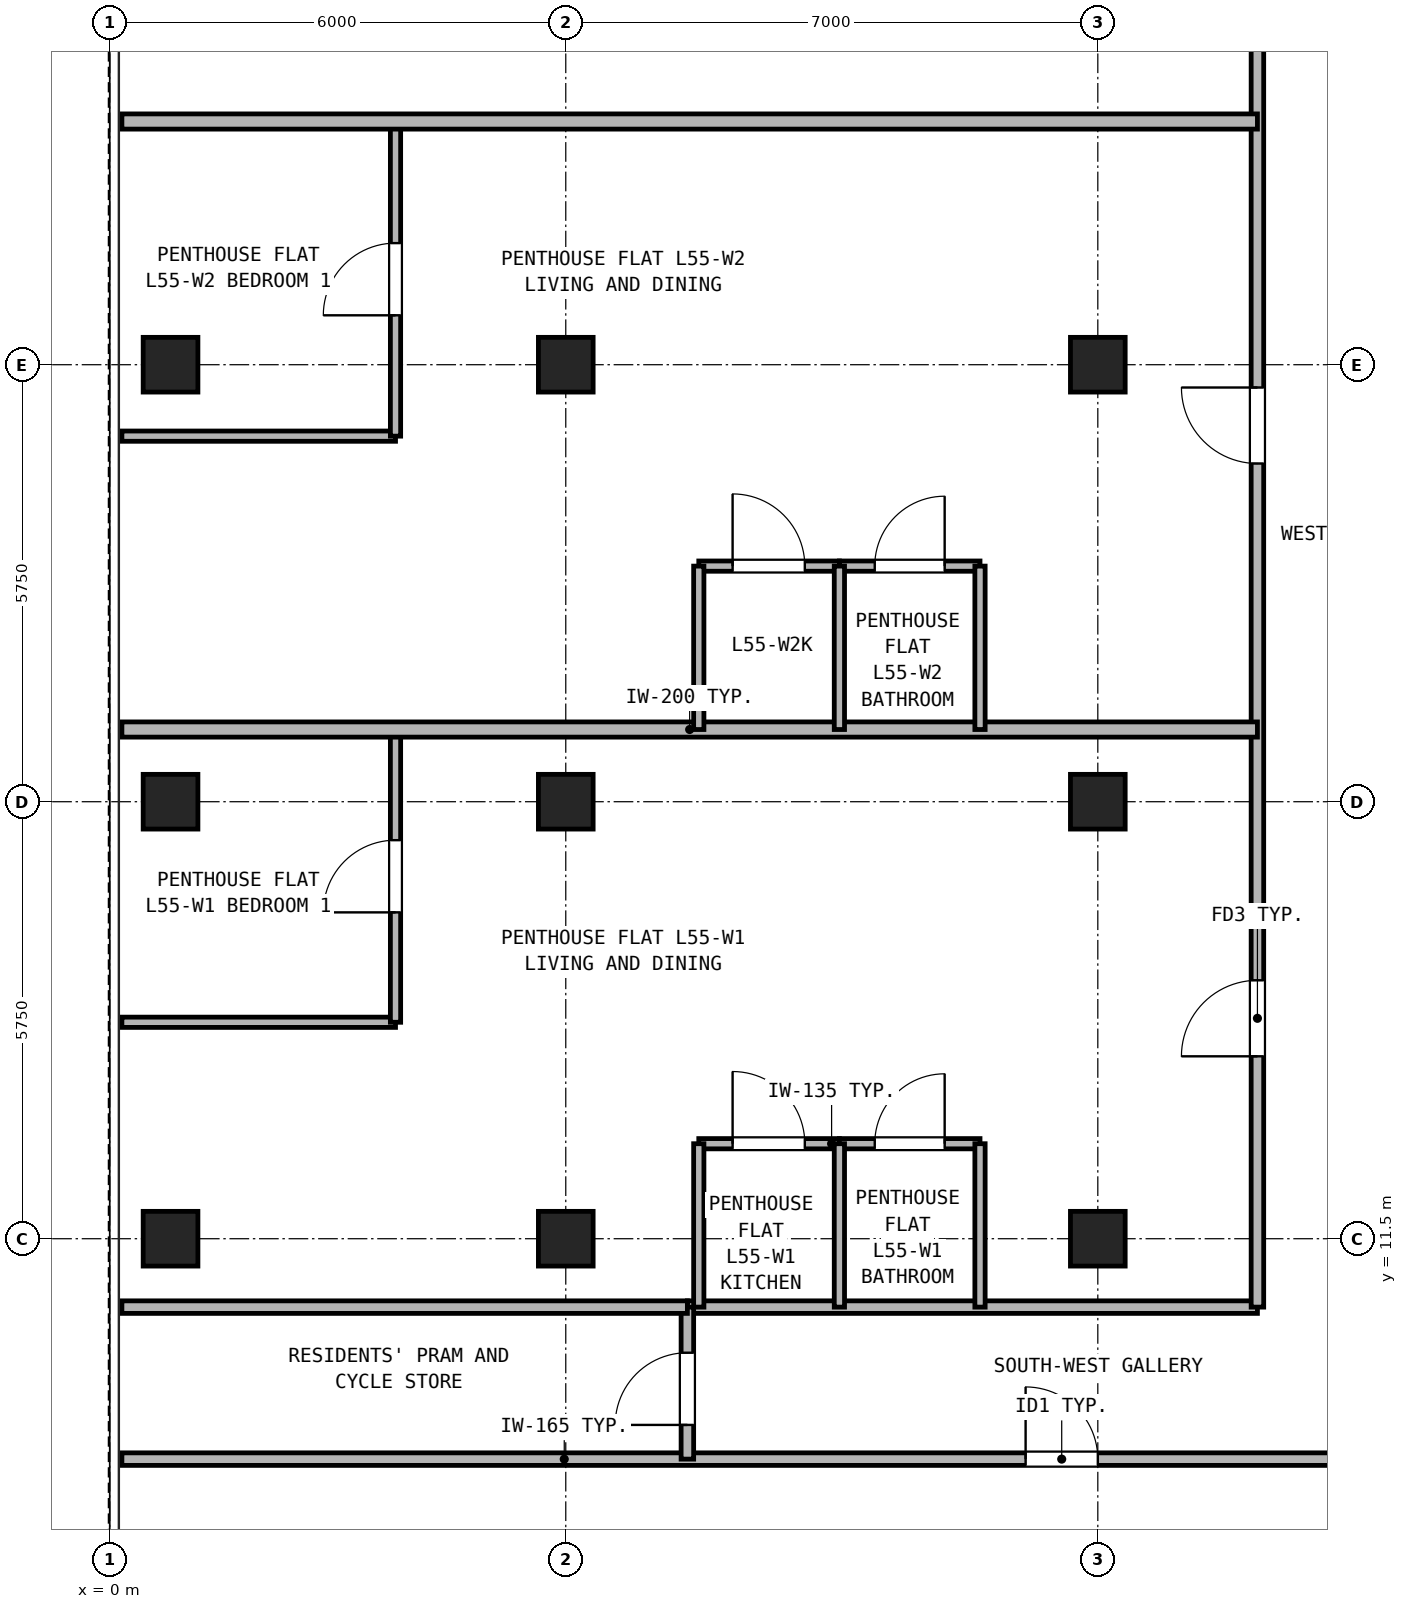
"""IFC4 building model, lengths in metres.
Left out: names, types, materials, properties, quantities, classifications, styles, units other than length and angle.
Written with IfcOpenShell. Run it as: python <this file> out.ifc"""

import sys

from ifc_helpers import new_model, si_unit, direction, frame, frame_2d, origin, origin_2d, place, context, subcontext, project, spatial, rectangle, hollow_rectangle, extrude, source, transform, mapped, element, fill, save


model = new_model("IFC4")
c1 = context("Model", 3, precision=1e-05, world=origin(), true_north=direction((0.0, 1.0)))
c2 = subcontext(c1, "Body", "Model", "MODEL_VIEW")
j1 = project(units=[si_unit("LENGTHUNIT", "METRE"), si_unit("PLANEANGLEUNIT", "RADIAN")], contexts=[c1])
p1 = place(None, origin())
s1 = spatial("IfcSite", under=j1, at=p1, CompositionType="ELEMENT")
p2 = place(p1, origin())
s2 = spatial("IfcBuilding", under=s1, at=p2, CompositionType="ELEMENT")
p3 = place(p2, frame((0.0, 0.0, 196.4)))
s3 = spatial("IfcBuildingStorey", under=s2, at=p3, CompositionType="ELEMENT", Elevation=196.4)
m1 = source(origin(), c2, "Body", "SweptSolid", [
    extrude(hollow_rectangle(XDim=0.72, YDim=0.72, WallThickness=0.04, at=origin_2d()), origin(), (0.0, 0.0, 1.0), 2.95),
])
for number, where, z_axis, x_axis in (
    (1, (0.8, 11.5, 0.0), (0.0, 0.0, 1.0), (1.0, 0.0, 0.0)),
    (2, (0.8, 17.25, 0.0), (0.0, 0.0, 1.0), (1.0, 0.0, 0.0)),
    (3, (0.8, 23.0, 0.0), (0.0, 0.0, 1.0), (1.0, 0.0, 0.0)),
    (4, (6.0, 11.5, 0.0), (0.0, 0.0, 1.0), (1.0, 0.0, 0.0)),
    (5, (6.0, 17.25, 0.0), (0.0, 0.0, 1.0), (1.0, 0.0, 0.0)),
    (6, (6.0, 23.0, 0.0), (0.0, 0.0, 1.0), (1.0, 0.0, 0.0)),
    (7, (13.0, 11.5, 0.0), (0.0, 0.0, 1.0), (1.0, 0.0, 0.0)),
    (8, (13.0, 17.25, 0.0), (0.0, 0.0, 1.0), (1.0, 0.0, 0.0)),
    (9, (13.0, 23.0, 0.0), (0.0, 0.0, 1.0), (1.0, 0.0, 0.0)),
):
    element("IfcColumn", number, at=place(p3, frame(where, z_axis=z_axis, x_axis=x_axis)), inside=s3, PredefinedType="COLUMN", context=c2, shape_type="MappedRepresentation", body=[
        mapped(m1, transform((0.0, 0.0, 0.0), x_axis=(1.0, 0.0, 0.0), y_axis=(0.0, 1.0, 0.0), z_axis=(0.0, 0.0, 1.0), scale=1.0)),
    ])
p4 = place(p3, frame((0.16, 8.6, 0.0), z_axis=(0.0, 0.0, 1.0), x_axis=(1.0, 0.0, 0.0)))
e10 = element("IfcWall", 10, at=p4, inside=s3, PredefinedType="PARTITIONING", context=c2, shape_type="SweptSolid", body=[
    extrude(rectangle(XDim=41.48, YDim=0.165, at=frame_2d((20.74, 0.0))), origin(), (0.0, 0.0, 1.0), 2.583),
])
p5 = place(p4, frame((11.89, 0.0, 0.0)))
e11 = element("IfcOpeningElement", 11, at=p5, cuts=e10, PredefinedType="OPENING", context=c2, shape_type="SweptSolid", body=[
    extrude(rectangle(XDim=0.95, YDim=2.15, at=frame_2d((0.475, 1.075))), frame((0.0, 0.093, 0.0), z_axis=(0.0, -1.0, 0.0), x_axis=(1.0, 0.0, 0.0)), (0.0, 0.0, 1.0), 0.185),
])
p6 = place(p4, frame((20.59, 0.0, 0.0)))
e12 = element("IfcOpeningElement", 12, at=p6, cuts=e10, PredefinedType="OPENING", context=c2, shape_type="SweptSolid", body=[
    extrude(rectangle(XDim=0.95, YDim=2.15, at=frame_2d((0.475, 1.075))), frame((0.0, 0.093, 0.0), z_axis=(0.0, -1.0, 0.0), x_axis=(1.0, 0.0, 0.0)), (0.0, 0.0, 1.0), 0.185),
])
p7 = place(p4, frame((27.59, 0.0, 0.0)))
e13 = element("IfcOpeningElement", 13, at=p7, cuts=e10, PredefinedType="OPENING", context=c2, shape_type="SweptSolid", body=[
    extrude(rectangle(XDim=0.95, YDim=2.15, at=frame_2d((0.475, 1.075))), frame((0.0, 0.093, 0.0), z_axis=(0.0, -1.0, 0.0), x_axis=(1.0, 0.0, 0.0)), (0.0, 0.0, 1.0), 0.185),
])
p8 = place(p4, frame((34.19, 0.0, 0.0)))
e14 = element("IfcOpeningElement", 14, at=p8, cuts=e10, PredefinedType="OPENING", context=c2, shape_type="SweptSolid", body=[
    extrude(rectangle(XDim=0.95, YDim=2.15, at=frame_2d((0.475, 1.075))), frame((0.0, 0.093, 0.0), z_axis=(0.0, -1.0, 0.0), x_axis=(1.0, 0.0, 0.0)), (0.0, 0.0, 1.0), 0.185),
])
p9 = place(p3, frame((7.6, 10.6, 0.0), z_axis=(0.0, 0.0, 1.0), x_axis=(1.0, 0.0, 0.0)))
e15 = element("IfcWall", 15, at=p9, inside=s3, PredefinedType="PARTITIONING", context=c2, shape_type="SweptSolid", body=[
    extrude(rectangle(XDim=7.5, YDim=0.165, at=frame_2d((3.75, 0.0))), origin(), (0.0, 0.0, 1.0), 2.95),
])
p10 = place(p3, frame((7.6, 8.6, 0.0), z_axis=(0.0, 0.0, 1.0), x_axis=(0.0, 1.0, 0.0)))
e16 = element("IfcWall", 16, at=p10, inside=s3, PredefinedType="PARTITIONING", context=c2, shape_type="SweptSolid", body=[
    extrude(rectangle(XDim=2.0, YDim=0.165, at=frame_2d((1.0, 0.0))), origin(), (0.0, 0.0, 1.0), 2.95),
])
p11 = place(p10, frame((0.45, 0.0, 0.0)))
e17 = element("IfcOpeningElement", 17, at=p11, cuts=e16, PredefinedType="OPENING", context=c2, shape_type="SweptSolid", body=[
    extrude(rectangle(XDim=0.95, YDim=2.15, at=frame_2d((0.475, 1.075))), frame((0.0, 0.093, 0.0), z_axis=(0.0, -1.0, 0.0), x_axis=(1.0, 0.0, 0.0)), (0.0, 0.0, 1.0), 0.185),
])
p12 = place(p3, frame((15.1, 10.6, 0.0), z_axis=(0.0, 0.0, 1.0), x_axis=(0.0, 1.0, 0.0)))
e18 = element("IfcWall", 18, at=p12, inside=s3, PredefinedType="PARTITIONING", context=c2, shape_type="SweptSolid", body=[
    extrude(rectangle(XDim=24.54, YDim=0.165, at=frame_2d((12.27, 0.0))), origin(), (0.0, 0.0, 1.0), 2.95),
])
p13 = place(p12, frame((3.3, 0.0, 0.0)))
e19 = element("IfcOpeningElement", 19, at=p13, cuts=e18, PredefinedType="OPENING", context=c2, shape_type="SweptSolid", body=[
    extrude(rectangle(XDim=1.0, YDim=2.15, at=frame_2d((0.5, 1.075))), frame((0.0, 0.093, 0.0), z_axis=(0.0, -1.0, 0.0), x_axis=(1.0, 0.0, 0.0)), (0.0, 0.0, 1.0), 0.185),
])
p14 = place(p12, frame((11.1, 0.0, 0.0)))
e20 = element("IfcOpeningElement", 20, at=p14, cuts=e18, PredefinedType="OPENING", context=c2, shape_type="SweptSolid", body=[
    extrude(rectangle(XDim=1.0, YDim=2.15, at=frame_2d((0.5, 1.075))), frame((0.0, 0.093, 0.0), z_axis=(0.0, -1.0, 0.0), x_axis=(1.0, 0.0, 0.0)), (0.0, 0.0, 1.0), 0.185),
])
p15 = place(p12, frame((18.0, 0.0, 0.0)))
e21 = element("IfcOpeningElement", 21, at=p15, cuts=e18, PredefinedType="OPENING", context=c2, shape_type="SweptSolid", body=[
    extrude(rectangle(XDim=1.0, YDim=2.15, at=frame_2d((0.5, 1.075))), frame((0.0, 0.093, 0.0), z_axis=(0.0, -1.0, 0.0), x_axis=(1.0, 0.0, 0.0)), (0.0, 0.0, 1.0), 0.185),
])
p16 = place(p3, frame((0.16, 10.6, 0.0), z_axis=(0.0, 0.0, 1.0), x_axis=(1.0, 0.0, 0.0)))
e22 = element("IfcWall", 22, at=p16, inside=s3, PredefinedType="PARTITIONING", context=c2, shape_type="SweptSolid", body=[
    extrude(rectangle(XDim=7.44, YDim=0.165, at=frame_2d((3.72, 0.0))), origin(), (0.0, 0.0, 1.0), 2.95),
])
p17 = place(p3, frame((7.75, 12.75, 0.0), z_axis=(0.0, 0.0, 1.0), x_axis=(1.0, 0.0, 0.0)))
e23 = element("IfcWall", 23, at=p17, inside=s3, PredefinedType="PARTITIONING", context=c2, shape_type="SweptSolid", body=[
    extrude(rectangle(XDim=1.85, YDim=0.135, at=frame_2d((0.925, 0.0))), origin(), (0.0, 0.0, 1.0), 2.95),
])
p18 = place(p17, frame((0.445, 0.0, 0.0)))
e24 = element("IfcOpeningElement", 24, at=p18, cuts=e23, PredefinedType="OPENING", context=c2, shape_type="SweptSolid", body=[
    extrude(rectangle(XDim=0.95, YDim=2.15, at=frame_2d((0.475, 1.075))), frame((0.0, 0.077, 0.0), z_axis=(0.0, -1.0, 0.0), x_axis=(1.0, 0.0, 0.0)), (0.0, 0.0, 1.0), 0.155),
])
p19 = place(p3, frame((9.6, 12.75, 0.0), z_axis=(0.0, 0.0, 1.0), x_axis=(1.0, 0.0, 0.0)))
e25 = element("IfcWall", 25, at=p19, inside=s3, PredefinedType="PARTITIONING", context=c2, shape_type="SweptSolid", body=[
    extrude(rectangle(XDim=1.85, YDim=0.135, at=frame_2d((0.925, 0.0))), origin(), (0.0, 0.0, 1.0), 2.95),
])
p20 = place(p19, frame((0.465, 0.0, 0.0)))
e26 = element("IfcOpeningElement", 26, at=p20, cuts=e25, PredefinedType="OPENING", context=c2, shape_type="SweptSolid", body=[
    extrude(rectangle(XDim=0.92, YDim=2.1, at=frame_2d((0.46, 1.05))), frame((0.0, 0.077, 0.0), z_axis=(0.0, -1.0, 0.0), x_axis=(1.0, 0.0, 0.0)), (0.0, 0.0, 1.0), 0.155),
])
for number, where, z_axis, x_axis in (
    (27, (7.75, 10.6, 0.0), (0.0, 0.0, 1.0), (0.0, 1.0, 0.0)),
    (28, (9.6, 10.6, 0.0), (0.0, 0.0, 1.0), (0.0, 1.0, 0.0)),
    (29, (11.45, 10.6, 0.0), (0.0, 0.0, 1.0), (0.0, 1.0, 0.0)),
):
    element("IfcWall", number, at=place(p3, frame(where, z_axis=z_axis, x_axis=x_axis)), inside=s3, PredefinedType="PARTITIONING", context=c2, shape_type="SweptSolid", body=[
        extrude(rectangle(XDim=2.15, YDim=0.135, at=frame_2d((1.075, 0.0))), origin(), (0.0, 0.0, 1.0), 2.95),
    ])
p21 = place(p3, frame((0.16, 14.348, 0.0), z_axis=(0.0, 0.0, 1.0), x_axis=(1.0, 0.0, 0.0)))
e30 = element("IfcWall", 30, at=p21, inside=s3, PredefinedType="PARTITIONING", context=c2, shape_type="SweptSolid", body=[
    extrude(rectangle(XDim=3.6, YDim=0.135, at=frame_2d((1.8, 0.0))), origin(), (0.0, 0.0, 1.0), 2.583),
])
p22 = place(p3, frame((3.76, 14.348, 0.0), z_axis=(0.0, 0.0, 1.0), x_axis=(0.0, 1.0, 0.0)))
e31 = element("IfcWall", 31, at=p22, inside=s3, PredefinedType="PARTITIONING", context=c2, shape_type="SweptSolid", body=[
    extrude(rectangle(XDim=3.852, YDim=0.135, at=frame_2d((1.926, 0.0))), origin(), (0.0, 0.0, 1.0), 2.95),
])
p23 = place(p22, frame((1.446, 0.0, 0.0)))
e32 = element("IfcOpeningElement", 32, at=p23, cuts=e31, PredefinedType="OPENING", context=c2, shape_type="SweptSolid", body=[
    extrude(rectangle(XDim=0.95, YDim=2.15, at=frame_2d((0.475, 1.075))), frame((0.0, 0.077, 0.0), z_axis=(0.0, -1.0, 0.0), x_axis=(1.0, 0.0, 0.0)), (0.0, 0.0, 1.0), 0.155),
])
p24 = place(p3, frame((0.16, 18.2, 0.0), z_axis=(0.0, 0.0, 1.0), x_axis=(1.0, 0.0, 0.0)))
e33 = element("IfcWall", 33, at=p24, inside=s3, PredefinedType="PARTITIONING", context=c2, shape_type="SweptSolid", body=[
    extrude(rectangle(XDim=14.94, YDim=0.2, at=frame_2d((7.47, 0.0))), origin(), (0.0, 0.0, 1.0), 2.95),
])
p25 = place(p3, frame((7.75, 20.35, 0.0), z_axis=(0.0, 0.0, 1.0), x_axis=(1.0, 0.0, 0.0)))
e34 = element("IfcWall", 34, at=p25, inside=s3, PredefinedType="PARTITIONING", context=c2, shape_type="SweptSolid", body=[
    extrude(rectangle(XDim=1.85, YDim=0.135, at=frame_2d((0.925, 0.0))), origin(), (0.0, 0.0, 1.0), 2.583),
])
p26 = place(p25, frame((0.445, 0.0, 0.0)))
e35 = element("IfcOpeningElement", 35, at=p26, cuts=e34, PredefinedType="OPENING", context=c2, shape_type="SweptSolid", body=[
    extrude(rectangle(XDim=0.95, YDim=2.15, at=frame_2d((0.475, 1.075))), frame((0.0, 0.077, 0.0), z_axis=(0.0, -1.0, 0.0), x_axis=(1.0, 0.0, 0.0)), (0.0, 0.0, 1.0), 0.155),
])
p27 = place(p3, frame((9.6, 20.35, 0.0), z_axis=(0.0, 0.0, 1.0), x_axis=(1.0, 0.0, 0.0)))
e36 = element("IfcWall", 36, at=p27, inside=s3, PredefinedType="PARTITIONING", context=c2, shape_type="SweptSolid", body=[
    extrude(rectangle(XDim=1.85, YDim=0.135, at=frame_2d((0.925, 0.0))), origin(), (0.0, 0.0, 1.0), 2.583),
])
p28 = place(p27, frame((0.465, 0.0, 0.0)))
e37 = element("IfcOpeningElement", 37, at=p28, cuts=e36, PredefinedType="OPENING", context=c2, shape_type="SweptSolid", body=[
    extrude(rectangle(XDim=0.92, YDim=2.1, at=frame_2d((0.46, 1.05))), frame((0.0, 0.077, 0.0), z_axis=(0.0, -1.0, 0.0), x_axis=(1.0, 0.0, 0.0)), (0.0, 0.0, 1.0), 0.155),
])
for number, where, z_axis, x_axis in (
    (38, (7.75, 18.2, 0.0), (0.0, 0.0, 1.0), (0.0, 1.0, 0.0)),
    (39, (9.6, 18.2, 0.0), (0.0, 0.0, 1.0), (0.0, 1.0, 0.0)),
    (40, (11.45, 18.2, 0.0), (0.0, 0.0, 1.0), (0.0, 1.0, 0.0)),
):
    element("IfcWall", number, at=place(p3, frame(where, z_axis=z_axis, x_axis=x_axis)), inside=s3, PredefinedType="PARTITIONING", context=c2, shape_type="SweptSolid", body=[
        extrude(rectangle(XDim=2.15, YDim=0.135, at=frame_2d((1.075, 0.0))), origin(), (0.0, 0.0, 1.0), 2.95),
    ])
p29 = place(p3, frame((0.16, 22.06, 0.0), z_axis=(0.0, 0.0, 1.0), x_axis=(1.0, 0.0, 0.0)))
e41 = element("IfcWall", 41, at=p29, inside=s3, PredefinedType="PARTITIONING", context=c2, shape_type="SweptSolid", body=[
    extrude(rectangle(XDim=3.6, YDim=0.135, at=frame_2d((1.8, 0.0))), origin(), (0.0, 0.0, 1.0), 2.95),
])
p30 = place(p3, frame((3.76, 22.06, 0.0), z_axis=(0.0, 0.0, 1.0), x_axis=(0.0, 1.0, 0.0)))
e42 = element("IfcWall", 42, at=p30, inside=s3, PredefinedType="PARTITIONING", context=c2, shape_type="SweptSolid", body=[
    extrude(rectangle(XDim=4.14, YDim=0.135, at=frame_2d((2.07, 0.0))), origin(), (0.0, 0.0, 1.0), 2.95),
])
p31 = place(p30, frame((1.59, 0.0, 0.0)))
e43 = element("IfcOpeningElement", 43, at=p31, cuts=e42, PredefinedType="OPENING", context=c2, shape_type="SweptSolid", body=[
    extrude(rectangle(XDim=0.95, YDim=2.15, at=frame_2d((0.475, 1.075))), frame((0.0, 0.077, 0.0), z_axis=(0.0, -1.0, 0.0), x_axis=(1.0, 0.0, 0.0)), (0.0, 0.0, 1.0), 0.155),
])
p32 = place(p3, frame((0.16, 26.2, 0.0), z_axis=(0.0, 0.0, 1.0), x_axis=(1.0, 0.0, 0.0)))
e44 = element("IfcWall", 44, at=p32, inside=s3, PredefinedType="PARTITIONING", context=c2, shape_type="SweptSolid", body=[
    extrude(rectangle(XDim=14.94, YDim=0.2, at=frame_2d((7.47, 0.0))), origin(), (0.0, 0.0, 1.0), 2.95),
])
p33 = place(p5, frame((0.95, 0.0, 0.0), z_axis=(0.0, 0.0, 1.0), x_axis=(-1.0, 0.0, 0.0)))
e45 = element("IfcDoor", 45, at=p33, inside=s3, OperationType="SINGLE_SWING_LEFT", PredefinedType="DOOR", context=c2, shape_type="SweptSolid", body=[
    extrude(rectangle(XDim=0.95, YDim=2.15, at=frame_2d((0.475, 1.075))), frame((0.0, 0.025, 0.0), z_axis=(0.0, -1.0, 0.0), x_axis=(1.0, 0.0, 0.0)), (0.0, 0.0, 1.0), 0.05),
])
fill(e11, e45)
p34 = place(p11, frame((0.95, 0.0, 0.0), z_axis=(0.0, 0.0, 1.0), x_axis=(-1.0, 0.0, 0.0)))
e46 = element("IfcDoor", 46, at=p34, inside=s3, OperationType="SINGLE_SWING_LEFT", PredefinedType="DOOR", context=c2, shape_type="SweptSolid", body=[
    extrude(rectangle(XDim=0.95, YDim=2.15, at=frame_2d((0.475, 1.075))), frame((0.0, 0.025, 0.0), z_axis=(0.0, -1.0, 0.0), x_axis=(1.0, 0.0, 0.0)), (0.0, 0.0, 1.0), 0.05),
])
fill(e17, e46)
p35 = place(p18, origin())
e47 = element("IfcDoor", 47, at=p35, inside=s3, OperationType="SINGLE_SWING_LEFT", PredefinedType="DOOR", context=c2, shape_type="SweptSolid", body=[
    extrude(rectangle(XDim=0.95, YDim=2.15, at=frame_2d((0.475, 1.075))), frame((0.0, 0.025, 0.0), z_axis=(0.0, -1.0, 0.0), x_axis=(1.0, 0.0, 0.0)), (0.0, 0.0, 1.0), 0.05),
])
fill(e24, e47)
p36 = place(p20, origin())
e48 = element("IfcDoor", 48, at=p36, inside=s3, OperationType="SINGLE_SWING_RIGHT", PredefinedType="DOOR", context=c2, shape_type="SweptSolid", body=[
    extrude(rectangle(XDim=0.92, YDim=2.1, at=frame_2d((0.46, 1.05))), frame((0.0, 0.025, 0.0), z_axis=(0.0, -1.0, 0.0), x_axis=(1.0, 0.0, 0.0)), (0.0, 0.0, 1.0), 0.05),
])
fill(e26, e48)
p37 = place(p23, origin())
e49 = element("IfcDoor", 49, at=p37, inside=s3, OperationType="SINGLE_SWING_LEFT", PredefinedType="DOOR", context=c2, shape_type="SweptSolid", body=[
    extrude(rectangle(XDim=0.95, YDim=2.15, at=frame_2d((0.475, 1.075))), frame((0.0, 0.025, 0.0), z_axis=(0.0, -1.0, 0.0), x_axis=(1.0, 0.0, 0.0)), (0.0, 0.0, 1.0), 0.05),
])
fill(e32, e49)
p38 = place(p13, origin())
e50 = element("IfcDoor", 50, at=p38, inside=s3, OperationType="SINGLE_SWING_LEFT", PredefinedType="DOOR", context=c2, shape_type="SweptSolid", body=[
    extrude(rectangle(XDim=1.0, YDim=2.15, at=frame_2d((0.5, 1.075))), frame((0.0, 0.025, 0.0), z_axis=(0.0, -1.0, 0.0), x_axis=(1.0, 0.0, 0.0)), (0.0, 0.0, 1.0), 0.05),
])
fill(e19, e50)
p39 = place(p26, origin())
e51 = element("IfcDoor", 51, at=p39, inside=s3, OperationType="SINGLE_SWING_LEFT", PredefinedType="DOOR", context=c2, shape_type="SweptSolid", body=[
    extrude(rectangle(XDim=0.95, YDim=2.15, at=frame_2d((0.475, 1.075))), frame((0.0, 0.025, 0.0), z_axis=(0.0, -1.0, 0.0), x_axis=(1.0, 0.0, 0.0)), (0.0, 0.0, 1.0), 0.05),
])
fill(e35, e51)
p40 = place(p28, origin())
e52 = element("IfcDoor", 52, at=p40, inside=s3, OperationType="SINGLE_SWING_RIGHT", PredefinedType="DOOR", context=c2, shape_type="SweptSolid", body=[
    extrude(rectangle(XDim=0.92, YDim=2.1, at=frame_2d((0.46, 1.05))), frame((0.0, 0.025, 0.0), z_axis=(0.0, -1.0, 0.0), x_axis=(1.0, 0.0, 0.0)), (0.0, 0.0, 1.0), 0.05),
])
fill(e37, e52)
p41 = place(p31, origin())
e53 = element("IfcDoor", 53, at=p41, inside=s3, OperationType="SINGLE_SWING_LEFT", PredefinedType="DOOR", context=c2, shape_type="SweptSolid", body=[
    extrude(rectangle(XDim=0.95, YDim=2.15, at=frame_2d((0.475, 1.075))), frame((0.0, 0.025, 0.0), z_axis=(0.0, -1.0, 0.0), x_axis=(1.0, 0.0, 0.0)), (0.0, 0.0, 1.0), 0.05),
])
fill(e43, e53)
p42 = place(p14, origin())
e54 = element("IfcDoor", 54, at=p42, inside=s3, OperationType="SINGLE_SWING_RIGHT", PredefinedType="DOOR", context=c2, shape_type="SweptSolid", body=[
    extrude(rectangle(XDim=1.0, YDim=2.15, at=frame_2d((0.5, 1.075))), frame((0.0, 0.025, 0.0), z_axis=(0.0, -1.0, 0.0), x_axis=(1.0, 0.0, 0.0)), (0.0, 0.0, 1.0), 0.05),
])
fill(e20, e54)
save(model, sys.argv[1])
